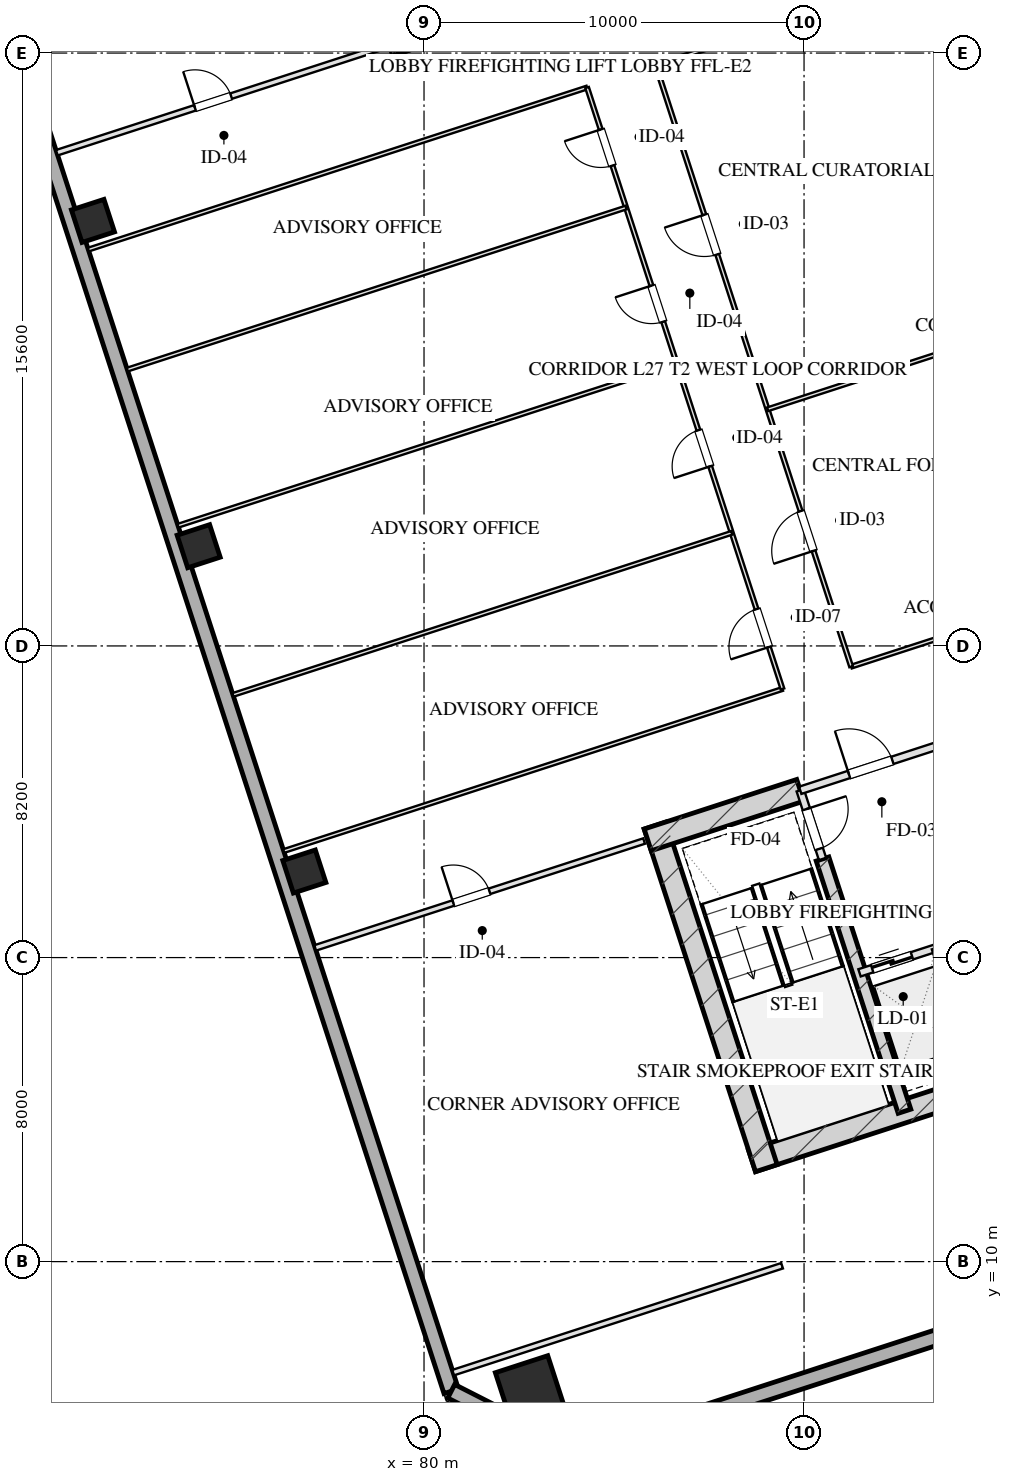
"""IFC4 building model, lengths in metres.
Left out: names, types, materials, properties, quantities, classifications, styles, units other than length and angle.
Written with IfcOpenShell. Run it as: python <this file> out.ifc"""

import sys

from ifc_helpers import new_model, si_unit, direction, frame, frame_2d, origin, origin_2d, place, context, subcontext, project, spatial, rectangle, hollow_rectangle, extrude, element, fill, save


model = new_model("IFC4")
c1 = context("Model", 3, precision=1e-05, world=origin(), true_north=direction((0.0, 1.0)))
c2 = subcontext(c1, "Body", "Model", "MODEL_VIEW")
j1 = project(units=[si_unit("LENGTHUNIT", "METRE"), si_unit("PLANEANGLEUNIT", "RADIAN")], contexts=[c1])
p1 = place(None, origin())
s1 = spatial("IfcSite", under=j1, at=p1, CompositionType="ELEMENT")
p2 = place(p1, origin())
s2 = spatial("IfcBuilding", under=s1, at=p2, CompositionType="ELEMENT")
p3 = place(p2, frame((0.0, 0.0, 106.95)))
s3 = spatial("IfcBuildingStorey", under=s2, at=p3, CompositionType="ELEMENT", Elevation=106.95)
p4 = place(p3, frame((88.63, 12.652, 0.0), z_axis=(0.0, 0.0, 1.0), x_axis=(0.95105714907, 0.309015046886, 0.0)))
e1 = element("IfcWall", 1, at=p4, inside=s3, PredefinedType="SHEAR", context=c2, shape_type="SweptSolid", body=[
    extrude(rectangle(XDim=16.4, YDim=0.6, at=frame_2d((8.2, 0.0))), origin(), (0.0, 0.0, 1.0), 3.45),
])
p5 = place(p3, frame((86.078, 21.475, 0.0), z_axis=(0.0, 0.0, 1.0), x_axis=(0.309017938678, -0.951056209472, 0.0)))
e2 = element("IfcWall", 2, at=p5, inside=s3, PredefinedType="SHEAR", context=c2, shape_type="SweptSolid", body=[
    extrude(rectangle(XDim=9.48, YDim=0.6, at=frame_2d((4.74, 0.0))), origin(), (0.0, 0.0, 1.0), 3.45),
])
p6 = place(p3, frame((90.486, 20.594, 0.0), z_axis=(0.0, 0.0, 1.0), x_axis=(0.309020428229, -0.951055400562, 0.0)))
e3 = element("IfcWall", 3, at=p6, inside=s3, PredefinedType="SHEAR", context=c2, shape_type="SweptSolid", body=[
    extrude(rectangle(XDim=6.98, YDim=0.35, at=frame_2d((3.49, 0.0))), origin(), (0.0, 0.0, 1.0), 3.45),
])
p7 = place(p3, frame((85.886, 21.097, 0.0), z_axis=(0.0, 0.0, 1.0), x_axis=(0.951068073652, 0.308981422225, 0.0)))
e4 = element("IfcWall", 4, at=p7, inside=s3, PredefinedType="SHEAR", context=c2, shape_type="SweptSolid", body=[
    extrude(rectangle(XDim=4.22, YDim=0.6, at=frame_2d((2.11, 0.0))), origin(), (0.0, 0.0, 1.0), 3.45),
])
p8 = place(p3, frame((79.466, 41.828, 0.0), z_axis=(0.0, 0.0, 1.0), x_axis=(-0.309041232772, 0.951048640421, 0.0)))
e5 = element("IfcWall", 5, at=p8, inside=s3, PredefinedType="SHEAR", context=c2, shape_type="SweptSolid", body=[
    extrude(rectangle(XDim=9.48, YDim=0.6, at=frame_2d((4.74, 0.0))), origin(), (0.0, 0.0, 1.0), 3.45),
])
p9 = place(p3, frame((79.087, 42.021, 0.0), z_axis=(0.0, 0.0, 1.0), x_axis=(0.951062550203, 0.3089984233, 0.0)))
e6 = element("IfcWall", 6, at=p9, inside=s3, PredefinedType="SHEAR", context=c2, shape_type="SweptSolid", body=[
    extrude(rectangle(XDim=4.22, YDim=0.6, at=frame_2d((2.11, 0.0))), origin(), (0.0, 0.0, 1.0), 3.45),
])
p10 = place(p3, frame((82.791, 6.612, 0.0), z_axis=(0.0, 0.0, 1.0), x_axis=(0.951056516295, 0.309016994375, 0.0)))
e7 = element("IfcColumn", 7, at=p10, inside=s3, PredefinedType="COLUMN", context=c2, shape_type="SweptSolid", body=[
    extrude(hollow_rectangle(XDim=1.45, YDim=1.45, WallThickness=0.05, at=origin_2d()), origin(), (0.0, 0.0, 1.0), 3.451),
])
for number, where, z_axis, x_axis in (
    (8, (76.851, 20.264, 0.0), (0.0, 0.0, 1.0), (0.951, 0.309, 0.0)),
    (9, (74.07, 28.824, 0.0), (0.0, 0.0, 1.0), (0.951, 0.309, 0.0)),
    (10, (71.289, 37.384, 0.0), (0.0, 0.0, 1.0), (0.951, 0.309, 0.0)),
):
    element("IfcColumn", number, at=place(p3, frame(where, z_axis=z_axis, x_axis=x_axis)), inside=s3, PredefinedType="COLUMN", context=c2, shape_type="SweptSolid", body=[
        extrude(hollow_rectangle(XDim=0.9, YDim=0.9, WallThickness=0.032, at=origin_2d()), origin(), (0.0, 0.0, 1.0), 3.451),
    ])
p11 = place(p3, frame((80.716, 6.59, 0.0), z_axis=(0.0, 0.0, 1.0), x_axis=(-0.309017542002, 0.95105633836, 0.0)))
e11 = element("IfcWall", 11, at=p11, inside=s3, PredefinedType="SOLIDWALL", context=c2, shape_type="SweptSolid", body=[
    extrude(rectangle(XDim=46.4, YDim=0.4, at=frame_2d((23.2, 0.0))), origin(), (0.0, 0.0, 1.0), 2.61),
])
p12 = place(p3, frame((111.953, 14.005, 0.0), z_axis=(0.0, 0.0, 1.0), x_axis=(-0.95105505922, -0.309021478754, 0.0)))
e12 = element("IfcWall", 12, at=p12, inside=s3, PredefinedType="SOLIDWALL", context=c2, shape_type="SweptSolid", body=[
    extrude(rectangle(XDim=29.4, YDim=0.4, at=frame_2d((14.7, 0.0))), origin(), (0.0, 0.0, 1.0), 2.61),
])
p13 = place(p3, frame((83.992, 4.92, 0.0), z_axis=(0.0, 0.0, 1.0), x_axis=(-0.891001999643, 0.45399937955, 0.0)))
e13 = element("IfcWall", 13, at=p13, inside=s3, PredefinedType="SOLIDWALL", context=c2, shape_type="SweptSolid", body=[
    extrude(rectangle(XDim=3.677, YDim=0.4, at=frame_2d((1.839, 0.0))), origin(), (0.0, 0.0, 1.0), 2.61),
])
p14 = place(p3, frame((89.899, 22.401, 0.0), z_axis=(0.0, 0.0, 1.0), x_axis=(0.308932062672, -0.951084108086, 0.0)))
e14 = element("IfcWall", 14, at=p14, inside=s3, PredefinedType="PARTITIONING", context=c2, shape_type="SweptSolid", body=[
    extrude(rectangle(XDim=1.9, YDim=0.2, at=frame_2d((0.95, 0.0))), origin(), (0.0, 0.0, 1.0), 3.175),
])
p15 = place(p14, frame((0.52, 0.0, 0.0)))
e15 = element("IfcOpeningElement", 15, at=p15, cuts=e14, PredefinedType="OPENING", context=c2, shape_type="SweptSolid", body=[
    extrude(rectangle(XDim=1.1, YDim=2.05, at=frame_2d((0.55, 1.025))), frame((0.0, 0.11, 0.0), z_axis=(0.0, -1.0, 0.0), x_axis=(1.0, 0.0, 0.0)), (0.0, 0.0, 1.0), 0.22),
])
p16 = place(p3, frame((89.899, 22.401, 0.0), z_axis=(0.0, 0.0, 1.0), x_axis=(0.951046716504, 0.309047153403, 0.0)))
e16 = element("IfcWall", 16, at=p16, inside=s3, PredefinedType="PARTITIONING", context=c2, shape_type="SweptSolid", body=[
    extrude(rectangle(XDim=3.83, YDim=0.2, at=frame_2d((1.915, 0.0))), origin(), (0.0, 0.0, 1.0), 3.175),
])
p17 = place(p16, frame((1.35, 0.0, 0.0)))
e17 = element("IfcOpeningElement", 17, at=p17, cuts=e16, PredefinedType="OPENING", context=c2, shape_type="SweptSolid", body=[
    extrude(rectangle(XDim=1.2, YDim=2.05, at=frame_2d((0.6, 1.025))), frame((0.0, 0.11, 0.0), z_axis=(0.0, -1.0, 0.0), x_axis=(1.0, 0.0, 0.0)), (0.0, 0.0, 1.0), 0.22),
])
p18 = place(p3, frame((91.46, 17.598, 0.0), z_axis=(0.0, 0.0, 1.0), x_axis=(0.951062257173, 0.308999325213, 0.0)))
e18 = element("IfcWall", 18, at=p18, inside=s3, PredefinedType="PARTITIONING", context=c2, shape_type="SweptSolid", body=[
    extrude(rectangle(XDim=2.1, YDim=0.2, at=frame_2d((1.05, 0.0))), origin(), (0.0, 0.0, 1.0), 3.175),
])
p19 = place(p18, frame((0.35, 0.0, 0.0)))
e19 = element("IfcOpeningElement", 19, at=p19, cuts=e18, PredefinedType="OPENING", context=c2, shape_type="SweptSolid", body=[
    extrude(rectangle(XDim=1.1, YDim=2.05, at=frame_2d((0.55, 1.025))), frame((0.0, 0.11, 0.0), z_axis=(0.0, -1.0, 0.0), x_axis=(1.0, 0.0, 0.0)), (0.0, 0.0, 1.0), 0.22),
])
p20 = place(p3, frame((93.457, 18.247, 0.0), z_axis=(0.0, 0.0, 1.0), x_axis=(0.3089935693, -0.951064127245, 0.0)))
e20 = element("IfcWall", 20, at=p20, inside=s3, PredefinedType="PARTITIONING", context=c2, shape_type="SweptSolid", body=[
    extrude(rectangle(XDim=3.7, YDim=0.2, at=frame_2d((1.85, 0.0))), origin(), (0.0, 0.0, 1.0), 3.175),
])
p21 = place(p3, frame((80.767, 7.079, 0.0), z_axis=(0.0, 0.0, 1.0), x_axis=(0.951057133767, 0.309015093986, 0.0)))
e21 = element("IfcWall", 21, at=p21, inside=s3, PredefinedType="PARTITIONING", context=c2, shape_type="SweptSolid", body=[
    extrude(rectangle(XDim=9.1, YDim=0.15, at=frame_2d((4.55, 0.0))), origin(), (0.0, 0.0, 1.0), 3.175),
])
p22 = place(p3, frame((77.136, 18.254, 0.0), z_axis=(0.0, 0.0, 1.0), x_axis=(0.951057133767, 0.309015093986, 0.0)))
e22 = element("IfcWall", 22, at=p22, inside=s3, PredefinedType="PARTITIONING", context=c2, shape_type="SweptSolid", body=[
    extrude(rectangle(XDim=9.1, YDim=0.15, at=frame_2d((4.55, 0.0))), origin(), (0.0, 0.0, 1.0), 3.175),
])
p23 = place(p22, frame((3.822, 0.0, 0.0)))
e23 = element("IfcOpeningElement", 23, at=p23, cuts=e22, PredefinedType="OPENING", context=c2, shape_type="SweptSolid", body=[
    extrude(rectangle(XDim=1.0, YDim=2.05, at=frame_2d((0.5, 1.025))), frame((0.0, 0.085, 0.0), z_axis=(0.0, -1.0, 0.0), x_axis=(1.0, 0.0, 0.0)), (0.0, 0.0, 1.0), 0.17),
])
p24 = place(p3, frame((70.338, 39.177, 0.0), z_axis=(0.0, 0.0, 1.0), x_axis=(0.951059695568, 0.309007209409, 0.0)))
e24 = element("IfcWall", 24, at=p24, inside=s3, PredefinedType="PARTITIONING", context=c2, shape_type="SweptSolid", body=[
    extrude(rectangle(XDim=9.1, YDim=0.15, at=frame_2d((4.55, 0.0))), origin(), (0.0, 0.0, 1.0), 3.175),
])
p25 = place(p24, frame((3.822, 0.0, 0.0)))
e25 = element("IfcOpeningElement", 25, at=p25, cuts=e24, PredefinedType="OPENING", context=c2, shape_type="SweptSolid", body=[
    extrude(rectangle(XDim=1.0, YDim=2.05, at=frame_2d((0.5, 1.025))), frame((0.0, 0.085, 0.0), z_axis=(0.0, -1.0, 0.0), x_axis=(1.0, 0.0, 0.0)), (0.0, 0.0, 1.0), 0.17),
])
p26 = place(p3, frame((76.308, 20.803, 0.0), z_axis=(0.0, 0.0, 1.0), x_axis=(0.951058377365, 0.309011266531, 0.0)))
e26 = element("IfcWall", 26, at=p26, inside=s3, PredefinedType="MOVABLE", context=c2, shape_type="SweptSolid", body=[
    extrude(rectangle(XDim=13.8, YDim=0.1, at=frame_2d((6.9, 0.0))), origin(), (0.0, 0.0, 1.0), 3.175),
])
p27 = place(p3, frame((91.24, 25.655, 0.0), z_axis=(0.0, 0.0, 1.0), x_axis=(0.951060182336, 0.309005711233, 0.0)))
e27 = element("IfcWall", 27, at=p27, inside=s3, PredefinedType="MOVABLE", context=c2, shape_type="SweptSolid", body=[
    extrude(rectangle(XDim=7.9, YDim=0.1, at=frame_2d((3.95, 0.0))), origin(), (0.0, 0.0, 1.0), 3.175),
])
p28 = place(p3, frame((71.166, 36.629, 0.0), z_axis=(0.0, 0.0, 1.0), x_axis=(0.951056688031, 0.309016465825, 0.0)))
e28 = element("IfcWall", 28, at=p28, inside=s3, PredefinedType="MOVABLE", context=c2, shape_type="SweptSolid", body=[
    extrude(rectangle(XDim=13.8, YDim=0.1, at=frame_2d((6.9, 0.0))), origin(), (0.0, 0.0, 1.0), 3.175),
])
p29 = place(p3, frame((86.097, 41.48, 0.0), z_axis=(0.0, 0.0, 1.0), x_axis=(0.951060182336, 0.309005711233, 0.0)))
e29 = element("IfcWall", 29, at=p29, inside=s3, PredefinedType="MOVABLE", context=c2, shape_type="SweptSolid", body=[
    extrude(rectangle(XDim=7.9, YDim=0.1, at=frame_2d((3.95, 0.0))), origin(), (0.0, 0.0, 1.0), 3.175),
])
p30 = place(p3, frame((89.433, 25.067, 0.0), z_axis=(0.0, 0.0, 1.0), x_axis=(-0.30901773025, 0.951056277195, 0.0)))
e30 = element("IfcWall", 30, at=p30, inside=s3, PredefinedType="MOVABLE", context=c2, shape_type="SweptSolid", body=[
    extrude(rectangle(XDim=16.64, YDim=0.1, at=frame_2d((8.32, 0.0))), origin(), (0.0, 0.0, 1.0), 3.175),
])
p31 = place(p30, frame((1.16, 0.0, 0.0)))
e31 = element("IfcOpeningElement", 31, at=p31, cuts=e30, PredefinedType="OPENING", context=c2, shape_type="SweptSolid", body=[
    extrude(rectangle(XDim=1.05, YDim=2.05, at=frame_2d((0.525, 1.025))), frame((0.0, 0.06, 0.0), z_axis=(0.0, -1.0, 0.0), x_axis=(1.0, 0.0, 0.0)), (0.0, 0.0, 1.0), 0.12),
])
p32 = place(p30, frame((6.16, 0.0, 0.0)))
e32 = element("IfcOpeningElement", 32, at=p32, cuts=e30, PredefinedType="OPENING", context=c2, shape_type="SweptSolid", body=[
    extrude(rectangle(XDim=1.0, YDim=2.05, at=frame_2d((0.5, 1.025))), frame((0.0, 0.06, 0.0), z_axis=(0.0, -1.0, 0.0), x_axis=(1.0, 0.0, 0.0)), (0.0, 0.0, 1.0), 0.12),
])
p33 = place(p30, frame((10.16, 0.0, 0.0)))
e33 = element("IfcOpeningElement", 33, at=p33, cuts=e30, PredefinedType="OPENING", context=c2, shape_type="SweptSolid", body=[
    extrude(rectangle(XDim=1.0, YDim=2.05, at=frame_2d((0.5, 1.025))), frame((0.0, 0.06, 0.0), z_axis=(0.0, -1.0, 0.0), x_axis=(1.0, 0.0, 0.0)), (0.0, 0.0, 1.0), 0.12),
])
p34 = place(p30, frame((14.48, 0.0, 0.0)))
e34 = element("IfcOpeningElement", 34, at=p34, cuts=e30, PredefinedType="OPENING", context=c2, shape_type="SweptSolid", body=[
    extrude(rectangle(XDim=1.0, YDim=2.05, at=frame_2d((0.5, 1.025))), frame((0.0, 0.06, 0.0), z_axis=(0.0, -1.0, 0.0), x_axis=(1.0, 0.0, 0.0)), (0.0, 0.0, 1.0), 0.12),
])
p35 = place(p3, frame((91.24, 25.655, 0.0), z_axis=(0.0, 0.0, 1.0), x_axis=(-0.30901773025, 0.951056277195, 0.0)))
e35 = element("IfcWall", 35, at=p35, inside=s3, PredefinedType="MOVABLE", context=c2, shape_type="SweptSolid", body=[
    extrude(rectangle(XDim=16.64, YDim=0.1, at=frame_2d((8.32, 0.0))), origin(), (0.0, 0.0, 1.0), 3.175),
])
p36 = place(p35, frame((3.204, 0.0, 0.0)))
e36 = element("IfcOpeningElement", 36, at=p36, cuts=e35, PredefinedType="OPENING", context=c2, shape_type="SweptSolid", body=[
    extrude(rectangle(XDim=1.1, YDim=2.05, at=frame_2d((0.55, 1.025))), frame((0.0, 0.06, 0.0), z_axis=(0.0, -1.0, 0.0), x_axis=(1.0, 0.0, 0.0)), (0.0, 0.0, 1.0), 0.12),
])
p37 = place(p35, frame((11.404, 0.0, 0.0)))
e37 = element("IfcOpeningElement", 37, at=p37, cuts=e35, PredefinedType="OPENING", context=c2, shape_type="SweptSolid", body=[
    extrude(rectangle(XDim=1.1, YDim=2.05, at=frame_2d((0.55, 1.025))), frame((0.0, 0.06, 0.0), z_axis=(0.0, -1.0, 0.0), x_axis=(1.0, 0.0, 0.0)), (0.0, 0.0, 1.0), 0.12),
])
p38 = place(p3, frame((89.039, 32.426, 0.0), z_axis=(0.0, 0.0, 1.0), x_axis=(0.951051099951, 0.309033663672, 0.0)))
e38 = element("IfcWall", 38, at=p38, inside=s3, PredefinedType="MOVABLE", context=c2, shape_type="SweptSolid", body=[
    extrude(rectangle(XDim=7.9, YDim=0.1, at=frame_2d((3.95, 0.0))), origin(), (0.0, 0.0, 1.0), 3.175),
])
p39 = place(p3, frame((74.973, 24.912, 0.0), z_axis=(0.0, 0.0, 1.0), x_axis=(0.951058377365, 0.309011266531, 0.0)))
e39 = element("IfcWall", 39, at=p39, inside=s3, PredefinedType="MOVABLE", context=c2, shape_type="SweptSolid", body=[
    extrude(rectangle(XDim=13.8, YDim=0.1, at=frame_2d((6.9, 0.0))), origin(), (0.0, 0.0, 1.0), 3.175),
])
for number, where, z_axis, x_axis in (
    (40, (73.527, 29.363, 0.0), (0.0, 0.0, 1.0), (0.951, 0.309, 0.0)),
    (41, (72.192, 33.471, 0.0), (0.0, 0.0, 1.0), (0.951, 0.309, 0.0)),
):
    element("IfcWall", number, at=place(p3, frame(where, z_axis=z_axis, x_axis=x_axis)), inside=s3, PredefinedType="MOVABLE", context=c2, shape_type="SweptSolid", body=[
        extrude(rectangle(XDim=13.8, YDim=0.1, at=frame_2d((6.9, 0.0))), origin(), (0.0, 0.0, 1.0), 3.175),
    ])
p40 = place(p15, origin())
e42 = element("IfcDoor", 42, at=p40, inside=s3, OperationType="SINGLE_SWING_LEFT", PredefinedType="DOOR", context=c2, shape_type="SweptSolid", body=[
    extrude(rectangle(XDim=1.1, YDim=2.05, at=frame_2d((0.55, 1.025))), frame((0.0, 0.025, 0.0), z_axis=(0.0, -1.0, 0.0), x_axis=(1.0, 0.0, 0.0)), (0.0, 0.0, 1.0), 0.05),
])
fill(e15, e42)
p41 = place(p17, origin())
e43 = element("IfcDoor", 43, at=p41, inside=s3, OperationType="SINGLE_SWING_LEFT", PredefinedType="DOOR", context=c2, shape_type="SweptSolid", body=[
    extrude(rectangle(XDim=1.2, YDim=2.05, at=frame_2d((0.6, 1.025))), frame((0.0, 0.025, 0.0), z_axis=(0.0, -1.0, 0.0), x_axis=(1.0, 0.0, 0.0)), (0.0, 0.0, 1.0), 0.05),
])
fill(e17, e43)
p42 = place(p19, origin())
e44 = element("IfcDoor", 44, at=p42, inside=s3, OperationType="DOUBLE_DOOR_SLIDING", PredefinedType="DOOR", context=c2, shape_type="SweptSolid", body=[
    extrude(rectangle(XDim=1.1, YDim=2.05, at=frame_2d((0.55, 1.025))), frame((0.0, 0.025, 0.0), z_axis=(0.0, -1.0, 0.0), x_axis=(1.0, 0.0, 0.0)), (0.0, 0.0, 1.0), 0.05),
])
fill(e19, e44)
p43 = place(p23, origin())
e45 = element("IfcDoor", 45, at=p43, inside=s3, OperationType="SINGLE_SWING_LEFT", PredefinedType="DOOR", context=c2, shape_type="SweptSolid", body=[
    extrude(rectangle(XDim=1.0, YDim=2.05, at=frame_2d((0.5, 1.025))), frame((0.0, 0.025, 0.0), z_axis=(0.0, -1.0, 0.0), x_axis=(1.0, 0.0, 0.0)), (0.0, 0.0, 1.0), 0.05),
])
fill(e23, e45)
p44 = place(p25, origin())
e46 = element("IfcDoor", 46, at=p44, inside=s3, OperationType="SINGLE_SWING_LEFT", PredefinedType="DOOR", context=c2, shape_type="SweptSolid", body=[
    extrude(rectangle(XDim=1.0, YDim=2.05, at=frame_2d((0.5, 1.025))), frame((0.0, 0.025, 0.0), z_axis=(0.0, -1.0, 0.0), x_axis=(1.0, 0.0, 0.0)), (0.0, 0.0, 1.0), 0.05),
])
fill(e25, e46)
p45 = place(p31, origin())
e47 = element("IfcDoor", 47, at=p45, inside=s3, OperationType="SINGLE_SWING_LEFT", PredefinedType="DOOR", context=c2, shape_type="SweptSolid", body=[
    extrude(rectangle(XDim=1.05, YDim=2.05, at=frame_2d((0.525, 1.025))), frame((0.0, 0.025, 0.0), z_axis=(0.0, -1.0, 0.0), x_axis=(1.0, 0.0, 0.0)), (0.0, 0.0, 1.0), 0.05),
])
fill(e31, e47)
p46 = place(p32, origin())
e48 = element("IfcDoor", 48, at=p46, inside=s3, OperationType="SINGLE_SWING_LEFT", PredefinedType="DOOR", context=c2, shape_type="SweptSolid", body=[
    extrude(rectangle(XDim=1.0, YDim=2.05, at=frame_2d((0.5, 1.025))), frame((0.0, 0.025, 0.0), z_axis=(0.0, -1.0, 0.0), x_axis=(1.0, 0.0, 0.0)), (0.0, 0.0, 1.0), 0.05),
])
fill(e32, e48)
p47 = place(p33, origin())
e49 = element("IfcDoor", 49, at=p47, inside=s3, OperationType="SINGLE_SWING_RIGHT", PredefinedType="DOOR", context=c2, shape_type="SweptSolid", body=[
    extrude(rectangle(XDim=1.0, YDim=2.05, at=frame_2d((0.5, 1.025))), frame((0.0, 0.025, 0.0), z_axis=(0.0, -1.0, 0.0), x_axis=(1.0, 0.0, 0.0)), (0.0, 0.0, 1.0), 0.05),
])
fill(e33, e49)
p48 = place(p34, origin())
e50 = element("IfcDoor", 50, at=p48, inside=s3, OperationType="SINGLE_SWING_RIGHT", PredefinedType="DOOR", context=c2, shape_type="SweptSolid", body=[
    extrude(rectangle(XDim=1.0, YDim=2.05, at=frame_2d((0.5, 1.025))), frame((0.0, 0.025, 0.0), z_axis=(0.0, -1.0, 0.0), x_axis=(1.0, 0.0, 0.0)), (0.0, 0.0, 1.0), 0.05),
])
fill(e34, e50)
p49 = place(p36, origin())
e51 = element("IfcDoor", 51, at=p49, inside=s3, OperationType="SINGLE_SWING_LEFT", PredefinedType="DOOR", context=c2, shape_type="SweptSolid", body=[
    extrude(rectangle(XDim=1.1, YDim=2.05, at=frame_2d((0.55, 1.025))), frame((0.0, 0.025, 0.0), z_axis=(0.0, -1.0, 0.0), x_axis=(1.0, 0.0, 0.0)), (0.0, 0.0, 1.0), 0.05),
])
fill(e36, e51)
p50 = place(p37, origin())
e52 = element("IfcDoor", 52, at=p50, inside=s3, OperationType="SINGLE_SWING_RIGHT", PredefinedType="DOOR", context=c2, shape_type="SweptSolid", body=[
    extrude(rectangle(XDim=1.1, YDim=2.05, at=frame_2d((0.55, 1.025))), frame((0.0, 0.025, 0.0), z_axis=(0.0, -1.0, 0.0), x_axis=(1.0, 0.0, 0.0)), (0.0, 0.0, 1.0), 0.05),
])
fill(e37, e52)
save(model, sys.argv[1])
